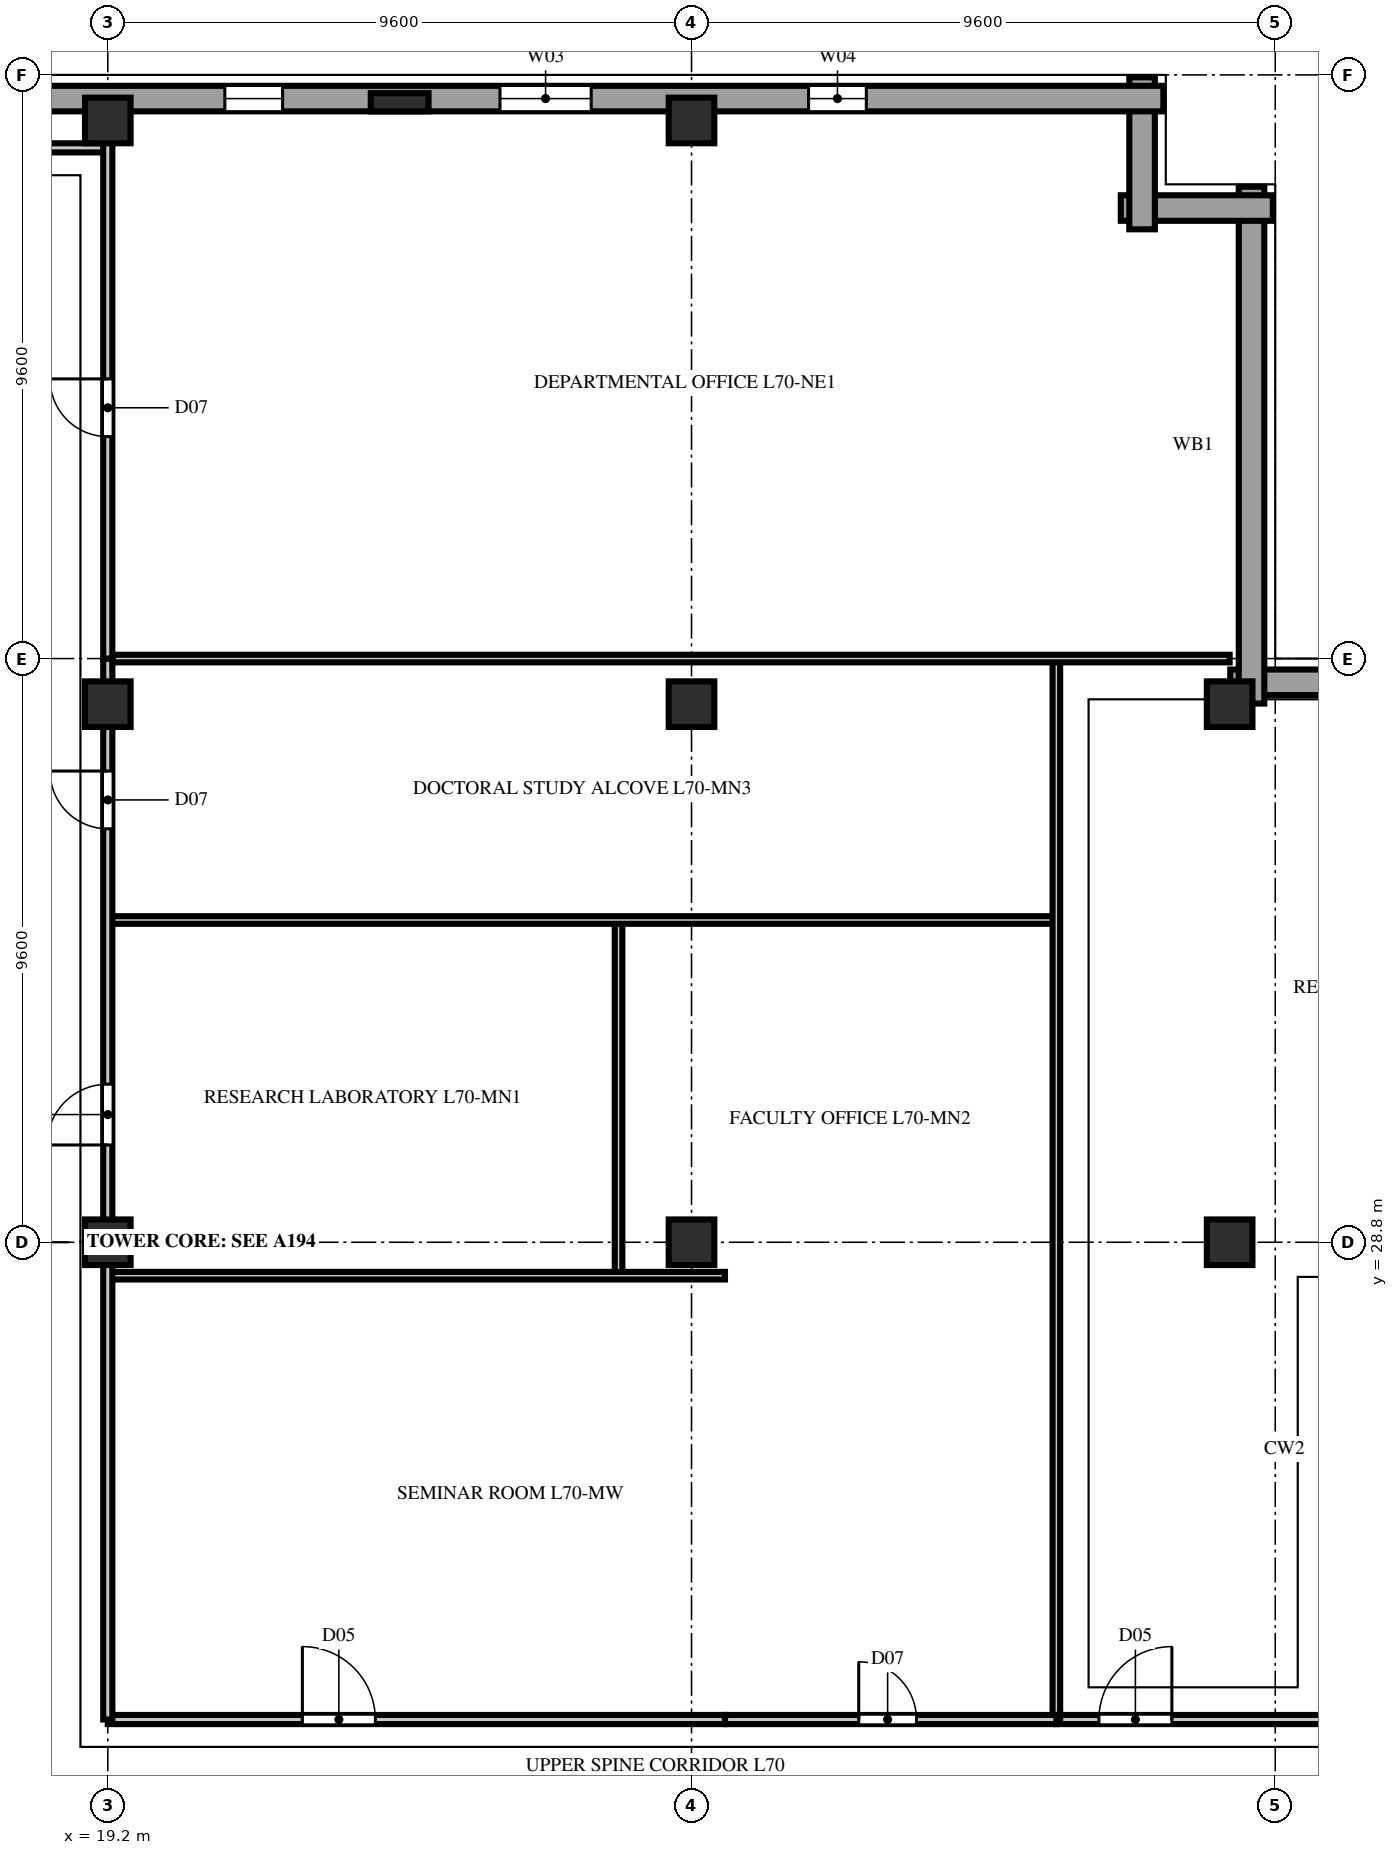
"""IFC4 building model, lengths in metres.
Left out: names, types, materials, properties, quantities, classifications, styles, units other than length and angle.
Written with IfcOpenShell. Run it as: python <this file> out.ifc"""

import sys

from ifc_helpers import new_model, si_unit, direction, frame, frame_2d, origin, origin_2d, place, context, subcontext, project, spatial, rectangle, extrude, element, fill, save


model = new_model("IFC4")
c1 = context("Model", 3, precision=1e-05, world=origin(), true_north=direction((0.0, 1.0)))
c2 = subcontext(c1, "Body", "Model", "MODEL_VIEW")
j1 = project(units=[si_unit("LENGTHUNIT", "METRE"), si_unit("PLANEANGLEUNIT", "RADIAN")], contexts=[c1])
p1 = place(None, origin())
s1 = spatial("IfcSite", under=j1, at=p1, CompositionType="ELEMENT")
p2 = place(p1, origin())
s2 = spatial("IfcBuilding", under=s1, at=p2, CompositionType="ELEMENT")
p3 = place(p2, frame((0.0, 0.0, 277.2)))
s3 = spatial("IfcBuildingStorey", under=s2, at=p3, CompositionType="ELEMENT", Elevation=277.2)
for number, where, z_axis, x_axis in (
    (1, (19.2, 28.8, 0.0), (0.0, 0.0, 1.0), (1.0, 0.0, 0.0)),
    (2, (19.2, 37.65, 0.0), (0.0, 0.0, 1.0), (1.0, 0.0, 0.0)),
    (3, (19.2, 47.25, 0.0), (0.0, 0.0, 1.0), (1.0, 0.0, 0.0)),
    (4, (28.8, 28.8, 0.0), (0.0, 0.0, 1.0), (1.0, 0.0, 0.0)),
    (5, (28.8, 37.65, 0.0), (0.0, 0.0, 1.0), (1.0, 0.0, 0.0)),
    (6, (28.8, 47.25, 0.0), (0.0, 0.0, 1.0), (1.0, 0.0, 0.0)),
    (7, (37.65, 28.8, 0.0), (0.0, 0.0, 1.0), (1.0, 0.0, 0.0)),
    (8, (37.65, 37.65, 0.0), (0.0, 0.0, 1.0), (1.0, 0.0, 0.0)),
):
    element("IfcColumn", number, at=place(p3, frame(where, z_axis=z_axis, x_axis=x_axis)), inside=s3, PredefinedType="COLUMN", context=c2, shape_type="SweptSolid", body=[
        extrude(rectangle(XDim=0.75, YDim=0.75, at=origin_2d()), origin(), (0.0, 0.0, 1.0), 3.8),
    ])
p4 = place(p3, frame((24.0, 47.55, 0.0), z_axis=(0.0, 0.0, 1.0), x_axis=(1.0, 0.0, 0.0)))
e9 = element("IfcColumn", 9, at=p4, inside=s3, PredefinedType="PILASTER", context=c2, shape_type="SweptSolid", body=[
    extrude(rectangle(XDim=0.95, YDim=0.3, at=origin_2d()), origin(), (0.0, 0.0, 1.0), 3.8),
])
for number, where, z_axis, x_axis in (
    (10, (46.16, 38.01, 0.0), (0.0, 0.0, 1.0), (-1.0, 0.0, 0.0)),
    (11, (38.01, 37.66, 0.0), (0.0, 0.0, 1.0), (0.0, 1.0, 0.0)),
):
    element("IfcWall", number, at=place(p3, frame(where, z_axis=z_axis, x_axis=x_axis)), inside=s3, PredefinedType="SOLIDWALL", context=c2, shape_type="SweptSolid", body=[
        extrude(rectangle(XDim=8.5, YDim=0.42, at=frame_2d((4.25, 0.0))), origin(), (0.0, 0.0, 1.0), 3.54),
    ])
for number, where, z_axis, x_axis in (
    (12, (38.36, 45.81, 0.0), (0.0, 0.0, 1.0), (-1.0, 0.0, 0.0)),
    (13, (36.21, 45.46, 0.0), (0.0, 0.0, 1.0), (0.0, 1.0, 0.0)),
):
    element("IfcWall", number, at=place(p3, frame(where, z_axis=z_axis, x_axis=x_axis)), inside=s3, PredefinedType="SOLIDWALL", context=c2, shape_type="SweptSolid", body=[
        extrude(rectangle(XDim=2.5, YDim=0.42, at=frame_2d((1.25, 0.0))), origin(), (0.0, 0.0, 1.0), 3.54),
    ])
p5 = place(p3, frame((36.56, 47.61, 0.0), z_axis=(0.0, 0.0, 1.0), x_axis=(-1.0, 0.0, 0.0)))
e14 = element("IfcWall", 14, at=p5, inside=s3, PredefinedType="SOLIDWALL", context=c2, shape_type="SweptSolid", body=[
    extrude(rectangle(XDim=34.085, YDim=0.42, at=frame_2d((17.042, 0.0))), origin(), (0.0, 0.0, 1.0), 3.54),
])
p6 = place(p5, frame((4.885, 0.0, 0.9)))
e15 = element("IfcOpeningElement", 15, at=p6, cuts=e14, PredefinedType="OPENING", context=c2, shape_type="SweptSolid", body=[
    extrude(rectangle(XDim=0.95, YDim=1.85, at=frame_2d((0.475, 0.925))), frame((0.0, 0.222, 0.0), z_axis=(0.0, -1.0, 0.0), x_axis=(1.0, 0.0, 0.0)), (0.0, 0.0, 1.0), 0.444),
])
p7 = place(p5, frame((9.41, 0.0, 0.9)))
e16 = element("IfcOpeningElement", 16, at=p7, cuts=e14, PredefinedType="OPENING", context=c2, shape_type="SweptSolid", body=[
    extrude(rectangle(XDim=1.5, YDim=1.85, at=frame_2d((0.75, 0.925))), frame((0.0, 0.222, 0.0), z_axis=(0.0, -1.0, 0.0), x_axis=(1.0, 0.0, 0.0)), (0.0, 0.0, 1.0), 0.444),
])
p8 = place(p5, frame((14.485, 0.0, 0.9)))
e17 = element("IfcOpeningElement", 17, at=p8, cuts=e14, PredefinedType="OPENING", context=c2, shape_type="SweptSolid", body=[
    extrude(rectangle(XDim=0.95, YDim=1.85, at=frame_2d((0.475, 0.925))), frame((0.0, 0.222, 0.0), z_axis=(0.0, -1.0, 0.0), x_axis=(1.0, 0.0, 0.0)), (0.0, 0.0, 1.0), 0.444),
])
p9 = place(p3, frame((17.05, 46.8, 0.0), z_axis=(0.0, 0.0, 1.0), x_axis=(1.0, 0.0, 0.0)))
e18 = element("IfcWall", 18, at=p9, inside=s3, PredefinedType="PARTITIONING", context=c2, shape_type="SweptSolid", body=[
    extrude(rectangle(XDim=2.15, YDim=0.15, at=frame_2d((1.075, 0.0))), origin(), (0.0, 0.0, 1.0), 3.54),
])
p10 = place(p3, frame((27.6, 28.25, 0.0), z_axis=(0.0, 0.0, 1.0), x_axis=(0.0, 1.0, 0.0)))
e19 = element("IfcWall", 19, at=p10, inside=s3, PredefinedType="PARTITIONING", context=c2, shape_type="SweptSolid", body=[
    extrude(rectangle(XDim=5.85, YDim=0.125, at=frame_2d((2.925, 0.0))), origin(), (0.0, 0.0, 1.0), 3.54),
])
p11 = place(p3, frame((19.2, 34.1, 0.0), z_axis=(0.0, 0.0, 1.0), x_axis=(1.0, 0.0, 0.0)))
e20 = element("IfcWall", 20, at=p11, inside=s3, PredefinedType="PARTITIONING", context=c2, shape_type="SweptSolid", body=[
    extrude(rectangle(XDim=15.6, YDim=0.125, at=frame_2d((7.8, 0.0))), origin(), (0.0, 0.0, 1.0), 3.54),
])
p12 = place(p3, frame((19.2, 20.95, 0.0), z_axis=(0.0, 0.0, 1.0), x_axis=(1.0, 0.0, 0.0)))
e21 = element("IfcWall", 21, at=p12, inside=s3, PredefinedType="PARTITIONING", context=c2, shape_type="SweptSolid", body=[
    extrude(rectangle(XDim=10.15, YDim=0.15, at=frame_2d((5.075, 0.0))), origin(), (0.0, 0.0, 1.0), 3.54),
])
p13 = place(p12, frame((3.2, 0.0, 0.0)))
e22 = element("IfcOpeningElement", 22, at=p13, cuts=e21, PredefinedType="OPENING", context=c2, shape_type="SweptSolid", body=[
    extrude(rectangle(XDim=1.2, YDim=2.2, at=frame_2d((0.6, 1.1))), frame((0.0, 0.087, 0.0), z_axis=(0.0, -1.0, 0.0), x_axis=(1.0, 0.0, 0.0)), (0.0, 0.0, 1.0), 0.174),
])
p14 = place(p3, frame((34.8, 20.95, 0.0), z_axis=(0.0, 0.0, 1.0), x_axis=(1.0, 0.0, 0.0)))
e23 = element("IfcWall", 23, at=p14, inside=s3, PredefinedType="PARTITIONING", context=c2, shape_type="SweptSolid", body=[
    extrude(rectangle(XDim=4.55, YDim=0.15, at=frame_2d((2.275, 0.0))), origin(), (0.0, 0.0, 1.0), 3.54),
])
p15 = place(p14, frame((0.7, 0.0, 0.0)))
e24 = element("IfcOpeningElement", 24, at=p15, cuts=e23, PredefinedType="OPENING", context=c2, shape_type="SweptSolid", body=[
    extrude(rectangle(XDim=1.2, YDim=2.2, at=frame_2d((0.6, 1.1))), frame((0.0, 0.087, 0.0), z_axis=(0.0, -1.0, 0.0), x_axis=(1.0, 0.0, 0.0)), (0.0, 0.0, 1.0), 0.174),
])
p16 = place(p3, frame((19.2, 28.25, 0.0), z_axis=(0.0, 0.0, 1.0), x_axis=(1.0, 0.0, 0.0)))
e25 = element("IfcWall", 25, at=p16, inside=s3, PredefinedType="PARTITIONING", context=c2, shape_type="SweptSolid", body=[
    extrude(rectangle(XDim=10.15, YDim=0.125, at=frame_2d((5.075, 0.0))), origin(), (0.0, 0.0, 1.0), 3.54),
])
p17 = place(p3, frame((34.8, 20.95, 0.0), z_axis=(0.0, 0.0, 1.0), x_axis=(0.0, 1.0, 0.0)))
e26 = element("IfcWall", 26, at=p17, inside=s3, PredefinedType="PARTITIONING", context=c2, shape_type="SweptSolid", body=[
    extrude(rectangle(XDim=17.45, YDim=0.125, at=frame_2d((8.725, 0.0))), origin(), (0.0, 0.0, 1.0), 3.54),
])
p18 = place(p3, frame((19.2, 20.95, 0.0), z_axis=(0.0, 0.0, 1.0), x_axis=(0.0, 1.0, 0.0)))
e27 = element("IfcWall", 27, at=p18, inside=s3, PredefinedType="PARTITIONING", context=c2, shape_type="SweptSolid", body=[
    extrude(rectangle(XDim=17.45, YDim=0.15, at=frame_2d((8.725, 0.0))), origin(), (0.0, 0.0, 1.0), 2.845),
])
p19 = place(p18, frame((9.45, 0.0, 0.0)))
e28 = element("IfcOpeningElement", 28, at=p19, cuts=e27, PredefinedType="OPENING", context=c2, shape_type="SweptSolid", body=[
    extrude(rectangle(XDim=1.0, YDim=2.2, at=frame_2d((0.5, 1.1))), frame((0.0, 0.087, 0.0), z_axis=(0.0, -1.0, 0.0), x_axis=(1.0, 0.0, 0.0)), (0.0, 0.0, 1.0), 0.174),
])
p20 = place(p18, frame((14.65, 0.0, 0.0)))
e29 = element("IfcOpeningElement", 29, at=p20, cuts=e27, PredefinedType="OPENING", context=c2, shape_type="SweptSolid", body=[
    extrude(rectangle(XDim=0.95, YDim=2.15, at=frame_2d((0.475, 1.075))), frame((0.0, 0.087, 0.0), z_axis=(0.0, -1.0, 0.0), x_axis=(1.0, 0.0, 0.0)), (0.0, 0.0, 1.0), 0.174),
])
p21 = place(p3, frame((19.28, 38.4, 0.0), z_axis=(0.0, 0.0, 1.0), x_axis=(1.0, 0.0, 0.0)))
e30 = element("IfcWall", 30, at=p21, inside=s3, PredefinedType="PARTITIONING", context=c2, shape_type="SweptSolid", body=[
    extrude(rectangle(XDim=18.37, YDim=0.125, at=frame_2d((9.185, 0.0))), origin(), (0.0, 0.0, 1.0), 3.54),
])
p22 = place(p3, frame((29.35, 20.95, 0.0), z_axis=(0.0, 0.0, 1.0), x_axis=(1.0, 0.0, 0.0)))
e31 = element("IfcWall", 31, at=p22, inside=s3, PredefinedType="PARTITIONING", context=c2, shape_type="SweptSolid", body=[
    extrude(rectangle(XDim=5.45, YDim=0.15, at=frame_2d((2.725, 0.0))), origin(), (0.0, 0.0, 1.0), 3.54),
])
p23 = place(p22, frame((2.2, 0.0, 0.0)))
e32 = element("IfcOpeningElement", 32, at=p23, cuts=e31, PredefinedType="OPENING", context=c2, shape_type="SweptSolid", body=[
    extrude(rectangle(XDim=0.95, YDim=2.15, at=frame_2d((0.475, 1.075))), frame((0.0, 0.087, 0.0), z_axis=(0.0, -1.0, 0.0), x_axis=(1.0, 0.0, 0.0)), (0.0, 0.0, 1.0), 0.174),
])
p24 = place(p3, frame((19.2, 38.4, 0.0), z_axis=(0.0, 0.0, 1.0), x_axis=(0.0, 1.0, 0.0)))
e33 = element("IfcWall", 33, at=p24, inside=s3, PredefinedType="PARTITIONING", context=c2, shape_type="SweptSolid", body=[
    extrude(rectangle(XDim=9.05, YDim=0.15, at=frame_2d((4.525, 0.0))), origin(), (0.0, 0.0, 1.0), 2.845),
])
p25 = place(p24, frame((3.65, 0.0, 0.0)))
e34 = element("IfcOpeningElement", 34, at=p25, cuts=e33, PredefinedType="OPENING", context=c2, shape_type="SweptSolid", body=[
    extrude(rectangle(XDim=0.95, YDim=2.15, at=frame_2d((0.475, 1.075))), frame((0.0, 0.087, 0.0), z_axis=(0.0, -1.0, 0.0), x_axis=(1.0, 0.0, 0.0)), (0.0, 0.0, 1.0), 0.174),
])
p26 = place(p6, origin())
e35 = element("IfcWindow", 35, at=p26, inside=s3, PartitioningType="SINGLE_PANEL", PredefinedType="WINDOW", context=c2, shape_type="SweptSolid", body=[
    extrude(rectangle(XDim=0.95, YDim=1.85, at=frame_2d((0.475, 0.925))), frame((0.0, 0.11, 0.0), z_axis=(0.0, -1.0, 0.0), x_axis=(1.0, 0.0, 0.0)), (0.0, 0.0, 1.0), 0.06),
])
fill(e15, e35)
p27 = place(p7, origin())
e36 = element("IfcWindow", 36, at=p27, inside=s3, PartitioningType="DOUBLE_PANEL_VERTICAL", PredefinedType="WINDOW", context=c2, shape_type="SweptSolid", body=[
    extrude(rectangle(XDim=1.5, YDim=1.85, at=frame_2d((0.75, 0.925))), frame((0.0, 0.11, 0.0), z_axis=(0.0, -1.0, 0.0), x_axis=(1.0, 0.0, 0.0)), (0.0, 0.0, 1.0), 0.06),
])
fill(e16, e36)
p28 = place(p8, origin())
e37 = element("IfcWindow", 37, at=p28, inside=s3, PartitioningType="SINGLE_PANEL", PredefinedType="WINDOW", context=c2, shape_type="SweptSolid", body=[
    extrude(rectangle(XDim=0.95, YDim=1.85, at=frame_2d((0.475, 0.925))), frame((0.0, 0.11, 0.0), z_axis=(0.0, -1.0, 0.0), x_axis=(1.0, 0.0, 0.0)), (0.0, 0.0, 1.0), 0.06),
])
fill(e17, e37)
p29 = place(p13, origin())
e38 = element("IfcDoor", 38, at=p29, inside=s3, OperationType="SINGLE_SWING_LEFT", PredefinedType="DOOR", context=c2, shape_type="SweptSolid", body=[
    extrude(rectangle(XDim=1.2, YDim=2.2, at=frame_2d((0.6, 1.1))), frame((0.0, 0.025, 0.0), z_axis=(0.0, -1.0, 0.0), x_axis=(1.0, 0.0, 0.0)), (0.0, 0.0, 1.0), 0.05),
])
fill(e22, e38)
p30 = place(p15, origin())
e39 = element("IfcDoor", 39, at=p30, inside=s3, OperationType="SINGLE_SWING_RIGHT", PredefinedType="DOOR", context=c2, shape_type="SweptSolid", body=[
    extrude(rectangle(XDim=1.2, YDim=2.2, at=frame_2d((0.6, 1.1))), frame((0.0, 0.025, 0.0), z_axis=(0.0, -1.0, 0.0), x_axis=(1.0, 0.0, 0.0)), (0.0, 0.0, 1.0), 0.05),
])
fill(e24, e39)
p31 = place(p19, origin())
e40 = element("IfcDoor", 40, at=p31, inside=s3, OperationType="SINGLE_SWING_LEFT", PredefinedType="DOOR", context=c2, shape_type="SweptSolid", body=[
    extrude(rectangle(XDim=1.0, YDim=2.2, at=frame_2d((0.5, 1.1))), frame((0.0, 0.025, 0.0), z_axis=(0.0, -1.0, 0.0), x_axis=(1.0, 0.0, 0.0)), (0.0, 0.0, 1.0), 0.05),
])
fill(e28, e40)
p32 = place(p20, origin())
e41 = element("IfcDoor", 41, at=p32, inside=s3, OperationType="SINGLE_SWING_RIGHT", PredefinedType="DOOR", context=c2, shape_type="SweptSolid", body=[
    extrude(rectangle(XDim=0.95, YDim=2.15, at=frame_2d((0.475, 1.075))), frame((0.0, 0.025, 0.0), z_axis=(0.0, -1.0, 0.0), x_axis=(1.0, 0.0, 0.0)), (0.0, 0.0, 1.0), 0.05),
])
fill(e29, e41)
p33 = place(p23, origin())
e42 = element("IfcDoor", 42, at=p33, inside=s3, OperationType="SINGLE_SWING_LEFT", PredefinedType="DOOR", context=c2, shape_type="SweptSolid", body=[
    extrude(rectangle(XDim=0.95, YDim=2.15, at=frame_2d((0.475, 1.075))), frame((0.0, 0.025, 0.0), z_axis=(0.0, -1.0, 0.0), x_axis=(1.0, 0.0, 0.0)), (0.0, 0.0, 1.0), 0.05),
])
fill(e32, e42)
p34 = place(p25, origin())
e43 = element("IfcDoor", 43, at=p34, inside=s3, OperationType="SINGLE_SWING_RIGHT", PredefinedType="DOOR", context=c2, shape_type="SweptSolid", body=[
    extrude(rectangle(XDim=0.95, YDim=2.15, at=frame_2d((0.475, 1.075))), frame((0.0, 0.025, 0.0), z_axis=(0.0, -1.0, 0.0), x_axis=(1.0, 0.0, 0.0)), (0.0, 0.0, 1.0), 0.05),
])
fill(e34, e43)
save(model, sys.argv[1])
